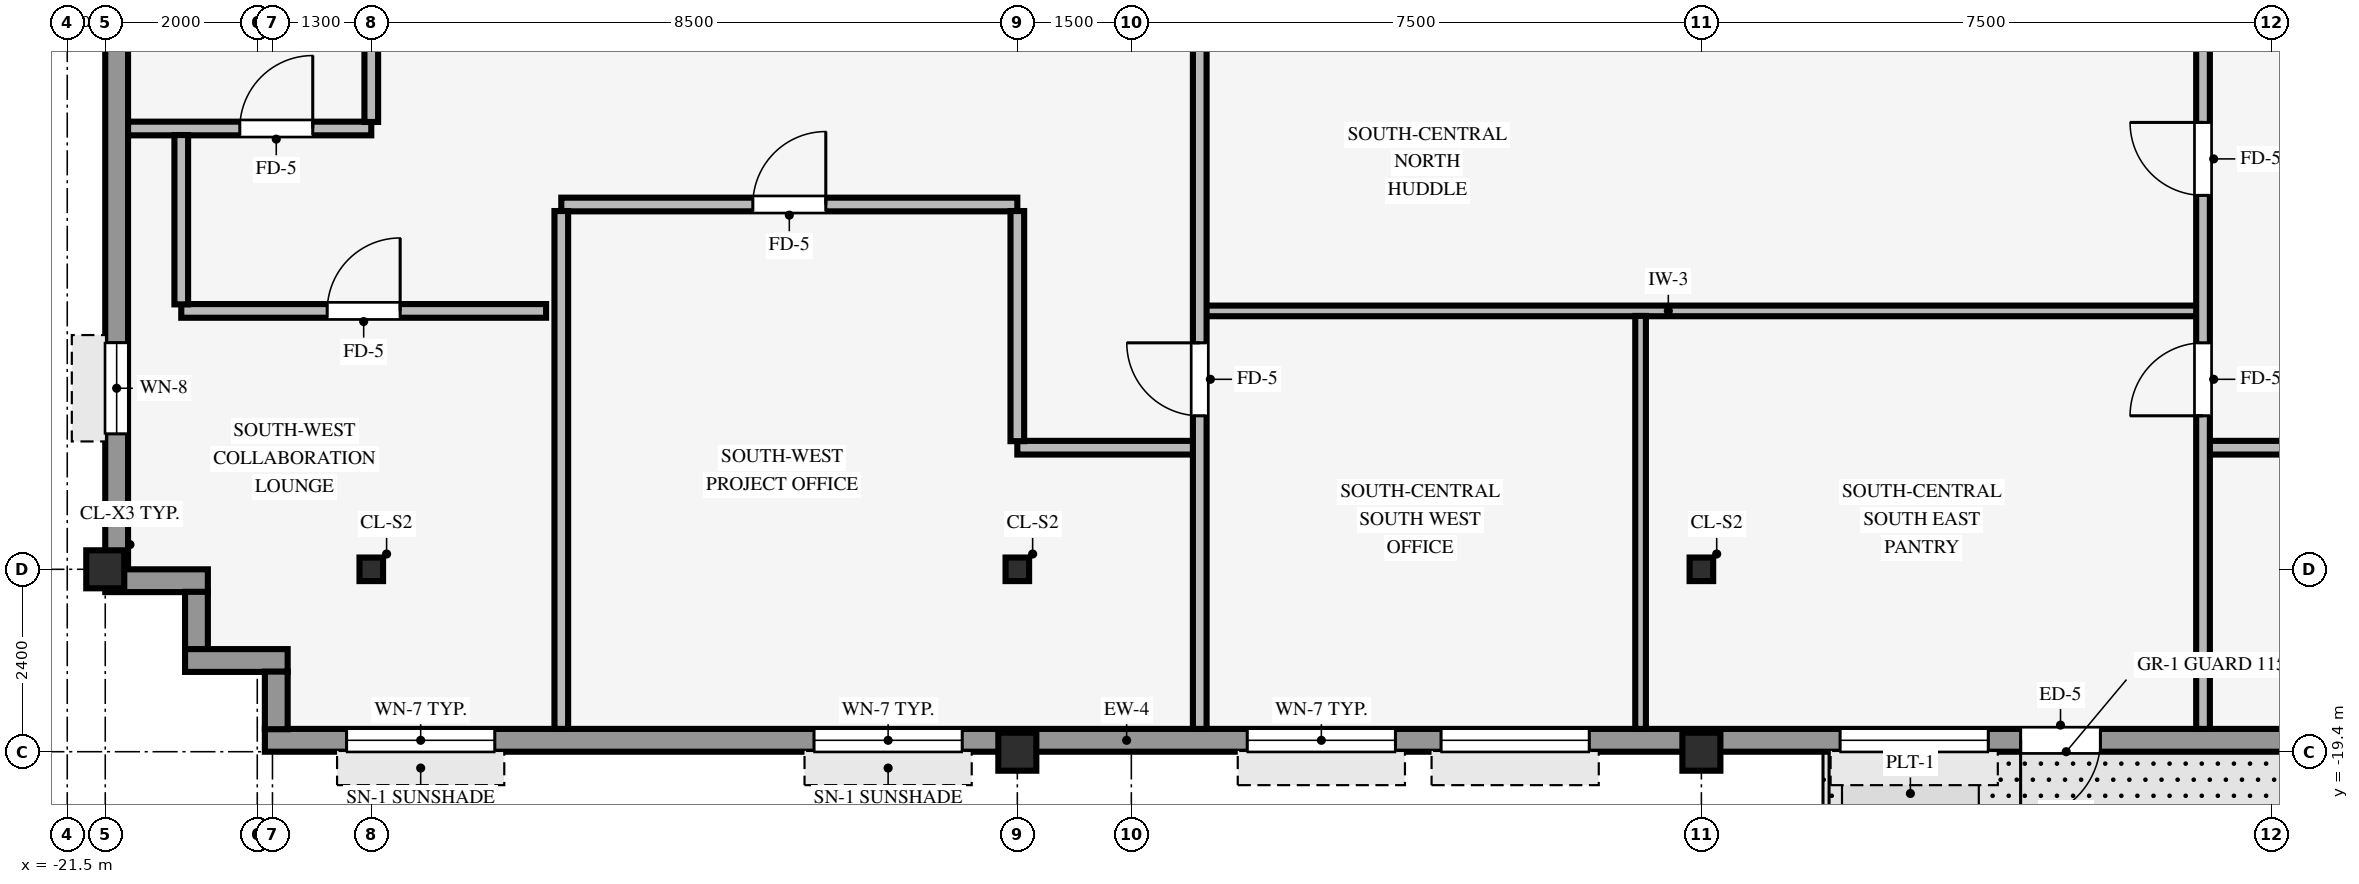
"""IFC4 building model, lengths in metres.
Left out: names, types, materials, properties, quantities, classifications, styles, units other than length and angle.
Written with IfcOpenShell. Run it as: python <this file> out.ifc"""

import sys

from ifc_helpers import new_model, si_unit, direction, frame, frame_2d, origin, origin_2d, place, context, subcontext, project, spatial, rectangle, hollow_rectangle, i_section, extrude, source, transform, mapped, element, fill, save


model = new_model("IFC4")
c1 = context("Model", 3, precision=1e-05, world=origin(), true_north=direction((0.0, 1.0)))
c2 = subcontext(c1, "Body", "Model", "MODEL_VIEW")
j1 = project(units=[si_unit("LENGTHUNIT", "METRE"), si_unit("PLANEANGLEUNIT", "RADIAN")], contexts=[c1])
p1 = place(None, origin())
s1 = spatial("IfcSite", under=j1, at=p1, CompositionType="ELEMENT")
p2 = place(p1, origin())
s2 = spatial("IfcBuilding", under=s1, at=p2, CompositionType="ELEMENT")
p3 = place(p2, frame((0.0, 0.0, 276.2)))
s3 = spatial("IfcBuildingStorey", under=s2, at=p3, CompositionType="ELEMENT", Elevation=276.2)
for number, where, z_axis, x_axis in (
    (1, (-21.0, -17.0, 0.0), (0.0, 0.0, 1.0), (1.0, 0.0, 0.0)),
    (2, (-9.0, -19.4, 0.0), (0.0, 0.0, 1.0), (1.0, 0.0, 0.0)),
    (3, (0.0, -19.4, 0.0), (0.0, 0.0, 1.0), (1.0, 0.0, 0.0)),
):
    element("IfcColumn", number, at=place(p3, frame(where, z_axis=z_axis, x_axis=x_axis)), inside=s3, PredefinedType="COLUMN", context=c2, shape_type="SweptSolid", body=[
        extrude(hollow_rectangle(XDim=0.5, YDim=0.5, WallThickness=0.032, InnerFilletRadius=0.032, OuterFilletRadius=0.064, at=origin_2d()), origin(), (0.0, 0.0, 1.0), 3.37),
    ])
for number, where, z_axis, x_axis in (
    (4, (0.0, -17.0, 0.0), (0.0, 0.0, 1.0), (1.0, 0.0, 0.0)),
    (5, (-17.5, -17.0, 0.0), (0.0, 0.0, 1.0), (1.0, 0.0, 0.0)),
    (6, (-9.0, -17.0, 0.0), (0.0, 0.0, 1.0), (1.0, 0.0, 0.0)),
):
    element("IfcColumn", number, at=place(p3, frame(where, z_axis=z_axis, x_axis=x_axis)), inside=s3, PredefinedType="COLUMN", context=c2, shape_type="SweptSolid", body=[
        extrude(i_section(OverallWidth=0.31, OverallDepth=0.31, WebThickness=0.015, FlangeThickness=0.015, FilletRadius=0.015, at=origin_2d()), origin(), (0.0, 0.0, 1.0), 3.37),
    ])
p4 = place(p3, frame((-18.9, -19.25, 0.0), z_axis=(0.0, 0.0, 1.0), x_axis=(1.0, 0.0, 0.0)))
e7 = element("IfcWall", 7, at=p4, inside=s3, PredefinedType="STANDARD", context=c2, shape_type="SweptSolid", body=[
    extrude(rectangle(XDim=35.6, YDim=0.3, at=frame_2d((17.8, 0.0))), origin(), (0.0, 0.0, 1.0), 2.705),
])
p5 = place(p4, frame((24.15, 0.0, 0.0), z_axis=(0.0, 0.0, 1.0), x_axis=(-1.0, 0.0, 0.0)))
e8 = element("IfcOpeningElement", 8, at=p5, cuts=e7, PredefinedType="OPENING", context=c2, shape_type="SweptSolid", body=[
    extrude(rectangle(XDim=1.05, YDim=2.1, at=frame_2d((0.525, 1.05))), frame((0.0, 0.16, 0.0), z_axis=(0.0, -1.0, 0.0), x_axis=(1.0, 0.0, 0.0)), (0.0, 0.0, 1.0), 0.32),
])
p6 = place(p4, frame((1.075, 0.0, 0.8)))
e9 = element("IfcOpeningElement", 9, at=p6, cuts=e7, PredefinedType="OPENING", context=c2, shape_type="SweptSolid", body=[
    extrude(rectangle(XDim=1.95, YDim=1.48, at=frame_2d((0.975, 0.74))), frame((0.0, 0.16, 0.0), z_axis=(0.0, -1.0, 0.0), x_axis=(1.0, 0.0, 0.0)), (0.0, 0.0, 1.0), 0.32),
])
p7 = place(p4, frame((7.225, 0.0, 0.8)))
e10 = element("IfcOpeningElement", 10, at=p7, cuts=e7, PredefinedType="OPENING", context=c2, shape_type="SweptSolid", body=[
    extrude(rectangle(XDim=1.95, YDim=1.48, at=frame_2d((0.975, 0.74))), frame((0.0, 0.16, 0.0), z_axis=(0.0, -1.0, 0.0), x_axis=(1.0, 0.0, 0.0)), (0.0, 0.0, 1.0), 0.32),
])
p8 = place(p4, frame((12.925, 0.0, 0.8)))
e11 = element("IfcOpeningElement", 11, at=p8, cuts=e7, PredefinedType="OPENING", context=c2, shape_type="SweptSolid", body=[
    extrude(rectangle(XDim=1.95, YDim=1.48, at=frame_2d((0.975, 0.74))), frame((0.0, 0.16, 0.0), z_axis=(0.0, -1.0, 0.0), x_axis=(1.0, 0.0, 0.0)), (0.0, 0.0, 1.0), 0.32),
])
p9 = place(p4, frame((15.475, 0.0, 0.8)))
e12 = element("IfcOpeningElement", 12, at=p9, cuts=e7, PredefinedType="OPENING", context=c2, shape_type="SweptSolid", body=[
    extrude(rectangle(XDim=1.95, YDim=1.48, at=frame_2d((0.975, 0.74))), frame((0.0, 0.16, 0.0), z_axis=(0.0, -1.0, 0.0), x_axis=(1.0, 0.0, 0.0)), (0.0, 0.0, 1.0), 0.32),
])
p10 = place(p4, frame((20.725, 0.0, 0.8)))
e13 = element("IfcOpeningElement", 13, at=p10, cuts=e7, PredefinedType="OPENING", context=c2, shape_type="SweptSolid", body=[
    extrude(rectangle(XDim=1.95, YDim=1.48, at=frame_2d((0.975, 0.74))), frame((0.0, 0.16, 0.0), z_axis=(0.0, -1.0, 0.0), x_axis=(1.0, 0.0, 0.0)), (0.0, 0.0, 1.0), 0.32),
])
p11 = place(p4, frame((31.225, 0.0, 0.8)))
e14 = element("IfcOpeningElement", 14, at=p11, cuts=e7, PredefinedType="OPENING", context=c2, shape_type="SweptSolid", body=[
    extrude(rectangle(XDim=1.95, YDim=1.48, at=frame_2d((0.975, 0.74))), frame((0.0, 0.16, 0.0), z_axis=(0.0, -1.0, 0.0), x_axis=(1.0, 0.0, 0.0)), (0.0, 0.0, 1.0), 0.32),
])
p12 = place(p3, frame((-20.85, -17.004, 0.0), z_axis=(0.0, 0.0, 1.0), x_axis=(0.0, 1.0, 0.0)))
e15 = element("IfcWall", 15, at=p12, inside=s3, PredefinedType="STANDARD", context=c2, shape_type="SweptSolid", body=[
    extrude(rectangle(XDim=34.008, YDim=0.3, at=frame_2d((17.004, 0.0))), origin(), (0.0, 0.0, 1.0), 2.705),
])
p13 = place(p12, frame((1.786, 0.0, 0.8)))
e16 = element("IfcOpeningElement", 16, at=p13, cuts=e15, PredefinedType="OPENING", context=c2, shape_type="SweptSolid", body=[
    extrude(rectangle(XDim=1.2, YDim=1.48, at=frame_2d((0.6, 0.74))), frame((0.0, 0.16, 0.0), z_axis=(0.0, -1.0, 0.0), x_axis=(1.0, 0.0, 0.0)), (0.0, 0.0, 1.0), 0.32),
])
p14 = place(p12, frame((8.159, 0.0, 0.8)))
e17 = element("IfcOpeningElement", 17, at=p14, cuts=e15, PredefinedType="OPENING", context=c2, shape_type="SweptSolid", body=[
    extrude(rectangle(XDim=1.2, YDim=1.48, at=frame_2d((0.6, 0.74))), frame((0.0, 0.16, 0.0), z_axis=(0.0, -1.0, 0.0), x_axis=(1.0, 0.0, 0.0)), (0.0, 0.0, 1.0), 0.32),
])
p15 = place(p12, frame((11.831, 0.0, 0.8)))
e18 = element("IfcOpeningElement", 18, at=p15, cuts=e15, PredefinedType="OPENING", context=c2, shape_type="SweptSolid", body=[
    extrude(rectangle(XDim=1.2, YDim=1.48, at=frame_2d((0.6, 0.74))), frame((0.0, 0.16, 0.0), z_axis=(0.0, -1.0, 0.0), x_axis=(1.0, 0.0, 0.0)), (0.0, 0.0, 1.0), 0.32),
])
p16 = place(p12, frame((15.054, 0.0, 0.8)))
e19 = element("IfcOpeningElement", 19, at=p16, cuts=e15, PredefinedType="OPENING", context=c2, shape_type="SweptSolid", body=[
    extrude(rectangle(XDim=1.2, YDim=1.48, at=frame_2d((0.6, 0.74))), frame((0.0, 0.16, 0.0), z_axis=(0.0, -1.0, 0.0), x_axis=(1.0, 0.0, 0.0)), (0.0, 0.0, 1.0), 0.32),
])
p17 = place(p12, frame((20.977, 0.0, 0.8)))
e20 = element("IfcOpeningElement", 20, at=p17, cuts=e15, PredefinedType="OPENING", context=c2, shape_type="SweptSolid", body=[
    extrude(rectangle(XDim=1.2, YDim=1.48, at=frame_2d((0.6, 0.74))), frame((0.0, 0.16, 0.0), z_axis=(0.0, -1.0, 0.0), x_axis=(1.0, 0.0, 0.0)), (0.0, 0.0, 1.0), 0.32),
])
p18 = place(p12, frame((24.649, 0.0, 0.8)))
e21 = element("IfcOpeningElement", 21, at=p18, cuts=e15, PredefinedType="OPENING", context=c2, shape_type="SweptSolid", body=[
    extrude(rectangle(XDim=1.2, YDim=1.48, at=frame_2d((0.6, 0.74))), frame((0.0, 0.16, 0.0), z_axis=(0.0, -1.0, 0.0), x_axis=(1.0, 0.0, 0.0)), (0.0, 0.0, 1.0), 0.32),
])
p19 = place(p12, frame((31.022, 0.0, 0.8)))
e22 = element("IfcOpeningElement", 22, at=p19, cuts=e15, PredefinedType="OPENING", context=c2, shape_type="SweptSolid", body=[
    extrude(rectangle(XDim=1.2, YDim=1.48, at=frame_2d((0.6, 0.74))), frame((0.0, 0.16, 0.0), z_axis=(0.0, -1.0, 0.0), x_axis=(1.0, 0.0, 0.0)), (0.0, 0.0, 1.0), 0.32),
])
p20 = place(p3, frame((-21.0, -17.15, 0.0), z_axis=(0.0, 0.0, 1.0), x_axis=(1.0, 0.0, 0.0)))
e23 = element("IfcWall", 23, at=p20, inside=s3, PredefinedType="STANDARD", context=c2, shape_type="SweptSolid", body=[
    extrude(rectangle(XDim=1.35, YDim=0.3, at=frame_2d((0.675, 0.0))), origin(), (0.0, 0.0, 1.0), 2.892),
])
p21 = place(p3, frame((-19.8, -18.054, 0.0), z_axis=(0.0, 0.0, 1.0), x_axis=(0.0, 1.0, 0.0)))
e24 = element("IfcWall", 24, at=p21, inside=s3, PredefinedType="STANDARD", context=c2, shape_type="SweptSolid", body=[
    extrude(rectangle(XDim=0.758, YDim=0.3, at=frame_2d((0.379, 0.0))), origin(), (0.0, 0.0, 1.0), 2.892),
])
p22 = place(p3, frame((-19.95, -18.2, 0.0), z_axis=(0.0, 0.0, 1.0), x_axis=(1.0, 0.0, 0.0)))
e25 = element("IfcWall", 25, at=p22, inside=s3, PredefinedType="STANDARD", context=c2, shape_type="SweptSolid", body=[
    extrude(rectangle(XDim=1.35, YDim=0.3, at=frame_2d((0.675, 0.0))), origin(), (0.0, 0.0, 1.0), 2.892),
])
p23 = place(p3, frame((-18.75, -19.104, 0.0), z_axis=(0.0, 0.0, 1.0), x_axis=(0.0, 1.0, 0.0)))
e26 = element("IfcWall", 26, at=p23, inside=s3, PredefinedType="STANDARD", context=c2, shape_type="SweptSolid", body=[
    extrude(rectangle(XDim=0.758, YDim=0.3, at=frame_2d((0.379, 0.0))), origin(), (0.0, 0.0, 1.0), 2.892),
])
p24 = place(p3, frame((-9.0, -15.4, 0.0), z_axis=(0.0, 0.0, 1.0), x_axis=(1.0, 0.0, 0.0)))
e27 = element("IfcWall", 27, at=p24, inside=s3, PredefinedType="PARTITIONING", context=c2, shape_type="SweptSolid", body=[
    extrude(rectangle(XDim=2.324, YDim=0.18, at=frame_2d((1.162, 0.0))), origin(), (0.0, 0.0, 1.0), 3.36),
])
p25 = place(p3, frame((6.666, -15.4, 0.0), z_axis=(0.0, 0.0, 1.0), x_axis=(1.0, 0.0, 0.0)))
e28 = element("IfcWall", 28, at=p25, inside=s3, PredefinedType="PARTITIONING", context=c2, shape_type="SweptSolid", body=[
    extrude(rectangle(XDim=2.334, YDim=0.18, at=frame_2d((1.167, 0.0))), origin(), (0.0, 0.0, 1.0), 3.36),
])
p26 = place(p3, frame((-20.0, -13.6, 0.0), z_axis=(0.0, 0.0, 1.0), x_axis=(1.0, 0.0, 0.0)))
e29 = element("IfcWall", 29, at=p26, inside=s3, PredefinedType="PARTITIONING", context=c2, shape_type="SweptSolid", body=[
    extrude(rectangle(XDim=4.8, YDim=0.18, at=frame_2d((2.4, 0.0))), origin(), (0.0, 0.0, 1.0), 3.038),
])
p27 = place(p26, frame((1.92, 0.0, 0.0)))
e30 = element("IfcOpeningElement", 30, at=p27, cuts=e29, PredefinedType="OPENING", context=c2, shape_type="SweptSolid", body=[
    extrude(rectangle(XDim=0.96, YDim=2.1, at=frame_2d((0.48, 1.05))), frame((0.0, 0.1, 0.0), z_axis=(0.0, -1.0, 0.0), x_axis=(1.0, 0.0, 0.0)), (0.0, 0.0, 1.0), 0.2),
])
p28 = place(p3, frame((-6.524, -13.6, 0.0), z_axis=(0.0, 0.0, 1.0), x_axis=(1.0, 0.0, 0.0)))
e31 = element("IfcWall", 31, at=p28, inside=s3, PredefinedType="PARTITIONING", context=c2, shape_type="SweptSolid", body=[
    extrude(rectangle(XDim=13.058, YDim=0.14, at=frame_2d((6.529, 0.0))), origin(), (0.0, 0.0, 1.0), 3.038),
])
p29 = place(p3, frame((-15.0, -12.2, 0.0), z_axis=(0.0, 0.0, 1.0), x_axis=(1.0, 0.0, 0.0)))
e32 = element("IfcWall", 32, at=p29, inside=s3, PredefinedType="PARTITIONING", context=c2, shape_type="SweptSolid", body=[
    extrude(rectangle(XDim=6.0, YDim=0.18, at=frame_2d((3.0, 0.0))), origin(), (0.0, 0.0, 1.0), 3.36),
])
p30 = place(p29, frame((2.52, 0.0, 0.0)))
e33 = element("IfcOpeningElement", 33, at=p30, cuts=e32, PredefinedType="OPENING", context=c2, shape_type="SweptSolid", body=[
    extrude(rectangle(XDim=0.96, YDim=2.1, at=frame_2d((0.48, 1.05))), frame((0.0, 0.1, 0.0), z_axis=(0.0, -1.0, 0.0), x_axis=(1.0, 0.0, 0.0)), (0.0, 0.0, 1.0), 0.2),
])
p31 = place(p3, frame((-20.7, -11.2, 0.0), z_axis=(0.0, 0.0, 1.0), x_axis=(1.0, 0.0, 0.0)))
e34 = element("IfcWall", 34, at=p31, inside=s3, PredefinedType="PARTITIONING", context=c2, shape_type="SweptSolid", body=[
    extrude(rectangle(XDim=3.2, YDim=0.18, at=frame_2d((1.6, 0.0))), origin(), (0.0, 0.0, 1.0), 3.36),
])
p32 = place(p31, frame((1.47, 0.0, 0.0)))
e35 = element("IfcOpeningElement", 35, at=p32, cuts=e34, PredefinedType="OPENING", context=c2, shape_type="SweptSolid", body=[
    extrude(rectangle(XDim=0.96, YDim=2.1, at=frame_2d((0.48, 1.05))), frame((0.0, 0.1, 0.0), z_axis=(0.0, -1.0, 0.0), x_axis=(1.0, 0.0, 0.0)), (0.0, 0.0, 1.0), 0.2),
])
p33 = place(p3, frame((-20.0, -13.514, 0.0), z_axis=(0.0, 0.0, 1.0), x_axis=(0.0, 1.0, 0.0)))
e36 = element("IfcWall", 36, at=p33, inside=s3, PredefinedType="PARTITIONING", context=c2, shape_type="SweptSolid", body=[
    extrude(rectangle(XDim=2.228, YDim=0.18, at=frame_2d((1.114, 0.0))), origin(), (0.0, 0.0, 1.0), 3.36),
])
p34 = place(p3, frame((-17.5, -11.114, 0.0), z_axis=(0.0, 0.0, 1.0), x_axis=(0.0, 1.0, 0.0)))
e37 = element("IfcWall", 37, at=p34, inside=s3, PredefinedType="PARTITIONING", context=c2, shape_type="SweptSolid", body=[
    extrude(rectangle(XDim=1.118, YDim=0.18, at=frame_2d((0.559, 0.0))), origin(), (0.0, 0.0, 1.0), 2.892),
])
p35 = place(p3, frame((-15.0, -19.1, 0.0), z_axis=(0.0, 0.0, 1.0), x_axis=(0.0, 1.0, 0.0)))
e38 = element("IfcWall", 38, at=p35, inside=s3, PredefinedType="PARTITIONING", context=c2, shape_type="SweptSolid", body=[
    extrude(rectangle(XDim=6.814, YDim=0.18, at=frame_2d((3.407, 0.0))), origin(), (0.0, 0.0, 1.0), 3.36),
])
p36 = place(p3, frame((-9.0, -15.314, 0.0), z_axis=(0.0, 0.0, 1.0), x_axis=(0.0, 1.0, 0.0)))
e39 = element("IfcWall", 39, at=p36, inside=s3, PredefinedType="PARTITIONING", context=c2, shape_type="SweptSolid", body=[
    extrude(rectangle(XDim=3.028, YDim=0.18, at=frame_2d((1.514, 0.0))), origin(), (0.0, 0.0, 1.0), 2.892),
])
p37 = place(p3, frame((-6.6, -19.1, 0.0), z_axis=(0.0, 0.0, 1.0), x_axis=(0.0, 1.0, 0.0)))
e40 = element("IfcWall", 40, at=p37, inside=s3, PredefinedType="PARTITIONING", context=c2, shape_type="SweptSolid", body=[
    extrude(rectangle(XDim=17.764, YDim=0.18, at=frame_2d((8.882, 0.0))), origin(), (0.0, 0.0, 1.0), 3.36),
])
p38 = place(p37, frame((4.12, 0.0, 0.0)))
e41 = element("IfcOpeningElement", 41, at=p38, cuts=e40, PredefinedType="OPENING", context=c2, shape_type="SweptSolid", body=[
    extrude(rectangle(XDim=0.96, YDim=2.1, at=frame_2d((0.48, 1.05))), frame((0.0, 0.1, 0.0), z_axis=(0.0, -1.0, 0.0), x_axis=(1.0, 0.0, 0.0)), (0.0, 0.0, 1.0), 0.2),
])
p39 = place(p3, frame((-0.8, -19.1, 0.0), z_axis=(0.0, 0.0, 1.0), x_axis=(0.0, 1.0, 0.0)))
e42 = element("IfcWall", 42, at=p39, inside=s3, PredefinedType="PARTITIONING", context=c2, shape_type="SweptSolid", body=[
    extrude(rectangle(XDim=5.434, YDim=0.14, at=frame_2d((2.717, 0.0))), origin(), (0.0, 0.0, 1.0), 3.36),
])
p40 = place(p3, frame((6.6, -19.1, 0.0), z_axis=(0.0, 0.0, 1.0), x_axis=(0.0, 1.0, 0.0)))
e43 = element("IfcWall", 43, at=p40, inside=s3, PredefinedType="PARTITIONING", context=c2, shape_type="SweptSolid", body=[
    extrude(rectangle(XDim=17.764, YDim=0.18, at=frame_2d((8.882, 0.0))), origin(), (0.0, 0.0, 1.0), 3.36),
])
p41 = place(p40, frame((13.152, 0.0, 0.0)))
e44 = element("IfcOpeningElement", 44, at=p41, cuts=e43, PredefinedType="OPENING", context=c2, shape_type="SweptSolid", body=[
    extrude(rectangle(XDim=0.96, YDim=2.1, at=frame_2d((0.48, 1.05))), frame((0.0, 0.1, 0.0), z_axis=(0.0, -1.0, 0.0), x_axis=(1.0, 0.0, 0.0)), (0.0, 0.0, 1.0), 0.2),
])
p42 = place(p40, frame((7.02, 0.0, 0.0)))
e45 = element("IfcOpeningElement", 45, at=p42, cuts=e43, PredefinedType="OPENING", context=c2, shape_type="SweptSolid", body=[
    extrude(rectangle(XDim=0.96, YDim=2.1, at=frame_2d((0.48, 1.05))), frame((0.0, 0.1, 0.0), z_axis=(0.0, -1.0, 0.0), x_axis=(1.0, 0.0, 0.0)), (0.0, 0.0, 1.0), 0.2),
])
p43 = place(p40, frame((4.12, 0.0, 0.0)))
e46 = element("IfcOpeningElement", 46, at=p43, cuts=e43, PredefinedType="OPENING", context=c2, shape_type="SweptSolid", body=[
    extrude(rectangle(XDim=0.96, YDim=2.1, at=frame_2d((0.48, 1.05))), frame((0.0, 0.1, 0.0), z_axis=(0.0, -1.0, 0.0), x_axis=(1.0, 0.0, 0.0)), (0.0, 0.0, 1.0), 0.2),
])
m1 = source(origin(), c2, "Body", "SweptSolid", [
    extrude(rectangle(XDim=1.05, YDim=2.1, at=frame_2d((0.525, 1.05))), frame((0.0, 0.025, 0.0), z_axis=(0.0, -1.0, 0.0), x_axis=(1.0, 0.0, 0.0)), (0.0, 0.0, 1.0), 0.05),
])
p44 = place(p5, origin())
e47 = element("IfcDoor", 47, at=p44, inside=s3, OperationType="SINGLE_SWING_RIGHT", PredefinedType="DOOR", context=c2, shape_type="MappedRepresentation", body=[
    mapped(m1, transform((0.0, 0.0, 0.0), scale=1.0)),
])
fill(e8, e47)
m2 = source(origin(), c2, "Body", "SweptSolid", [
    extrude(rectangle(XDim=1.95, YDim=1.48, at=frame_2d((0.975, 0.74))), frame((0.0, 0.03, 0.0), z_axis=(0.0, -1.0, 0.0), x_axis=(1.0, 0.0, 0.0)), (0.0, 0.0, 1.0), 0.06),
])
p45 = place(p6, origin())
e48 = element("IfcWindow", 48, at=p45, inside=s3, PartitioningType="SINGLE_PANEL", PredefinedType="WINDOW", context=c2, shape_type="MappedRepresentation", body=[
    mapped(m2, transform((0.0, 0.0, 0.0), scale=1.0)),
])
fill(e9, e48)
p46 = place(p7, origin())
e49 = element("IfcWindow", 49, at=p46, inside=s3, PartitioningType="SINGLE_PANEL", PredefinedType="WINDOW", context=c2, shape_type="MappedRepresentation", body=[
    mapped(m2, transform((0.0, 0.0, 0.0), scale=1.0)),
])
fill(e10, e49)
p47 = place(p8, origin())
e50 = element("IfcWindow", 50, at=p47, inside=s3, PartitioningType="SINGLE_PANEL", PredefinedType="WINDOW", context=c2, shape_type="MappedRepresentation", body=[
    mapped(m2, transform((0.0, 0.0, 0.0), scale=1.0)),
])
fill(e11, e50)
p48 = place(p9, origin())
e51 = element("IfcWindow", 51, at=p48, inside=s3, PartitioningType="SINGLE_PANEL", PredefinedType="WINDOW", context=c2, shape_type="MappedRepresentation", body=[
    mapped(m2, transform((0.0, 0.0, 0.0), scale=1.0)),
])
fill(e12, e51)
p49 = place(p10, origin())
e52 = element("IfcWindow", 52, at=p49, inside=s3, PartitioningType="SINGLE_PANEL", PredefinedType="WINDOW", context=c2, shape_type="MappedRepresentation", body=[
    mapped(m2, transform((0.0, 0.0, 0.0), scale=1.0)),
])
fill(e13, e52)
m3 = source(origin(), c2, "Body", "SweptSolid", [
    extrude(rectangle(XDim=1.2, YDim=1.48, at=frame_2d((0.6, 0.74))), frame((0.0, 0.03, 0.0), z_axis=(0.0, -1.0, 0.0), x_axis=(1.0, 0.0, 0.0)), (0.0, 0.0, 1.0), 0.06),
])
p50 = place(p13, origin())
e53 = element("IfcWindow", 53, at=p50, inside=s3, PartitioningType="SINGLE_PANEL", PredefinedType="WINDOW", context=c2, shape_type="MappedRepresentation", body=[
    mapped(m3, transform((0.0, 0.0, 0.0), scale=1.0)),
])
fill(e16, e53)
m4 = source(origin(), c2, "Body", "SweptSolid", [
    extrude(rectangle(XDim=0.96, YDim=2.1, at=frame_2d((0.48, 1.05))), frame((0.0, 0.025, 0.0), z_axis=(0.0, -1.0, 0.0), x_axis=(1.0, 0.0, 0.0)), (0.0, 0.0, 1.0), 0.05),
])
p51 = place(p30, origin())
e54 = element("IfcDoor", 54, at=p51, inside=s3, OperationType="SINGLE_SWING_RIGHT", PredefinedType="DOOR", context=c2, shape_type="MappedRepresentation", body=[
    mapped(m4, transform((0.0, 0.0, 0.0), scale=1.0)),
])
fill(e33, e54)
p52 = place(p27, origin())
e55 = element("IfcDoor", 55, at=p52, inside=s3, OperationType="SINGLE_SWING_RIGHT", PredefinedType="DOOR", context=c2, shape_type="MappedRepresentation", body=[
    mapped(m4, transform((0.0, 0.0, 0.0), scale=1.0)),
])
fill(e30, e55)
p53 = place(p42, origin())
e56 = element("IfcDoor", 56, at=p53, inside=s3, OperationType="SINGLE_SWING_RIGHT", PredefinedType="DOOR", context=c2, shape_type="MappedRepresentation", body=[
    mapped(m4, transform((0.0, 0.0, 0.0), scale=1.0)),
])
fill(e45, e56)
p54 = place(p32, origin())
e57 = element("IfcDoor", 57, at=p54, inside=s3, OperationType="SINGLE_SWING_RIGHT", PredefinedType="DOOR", context=c2, shape_type="MappedRepresentation", body=[
    mapped(m4, transform((0.0, 0.0, 0.0), scale=1.0)),
])
fill(e35, e57)
p55 = place(p38, origin())
e58 = element("IfcDoor", 58, at=p55, inside=s3, OperationType="SINGLE_SWING_RIGHT", PredefinedType="DOOR", context=c2, shape_type="MappedRepresentation", body=[
    mapped(m4, transform((0.0, 0.0, 0.0), scale=1.0)),
])
fill(e41, e58)
p56 = place(p43, origin())
e59 = element("IfcDoor", 59, at=p56, inside=s3, OperationType="SINGLE_SWING_LEFT", PredefinedType="DOOR", context=c2, shape_type="MappedRepresentation", body=[
    mapped(m4, transform((0.0, 0.0, 0.0), scale=1.0)),
])
fill(e46, e59)
save(model, sys.argv[1])
